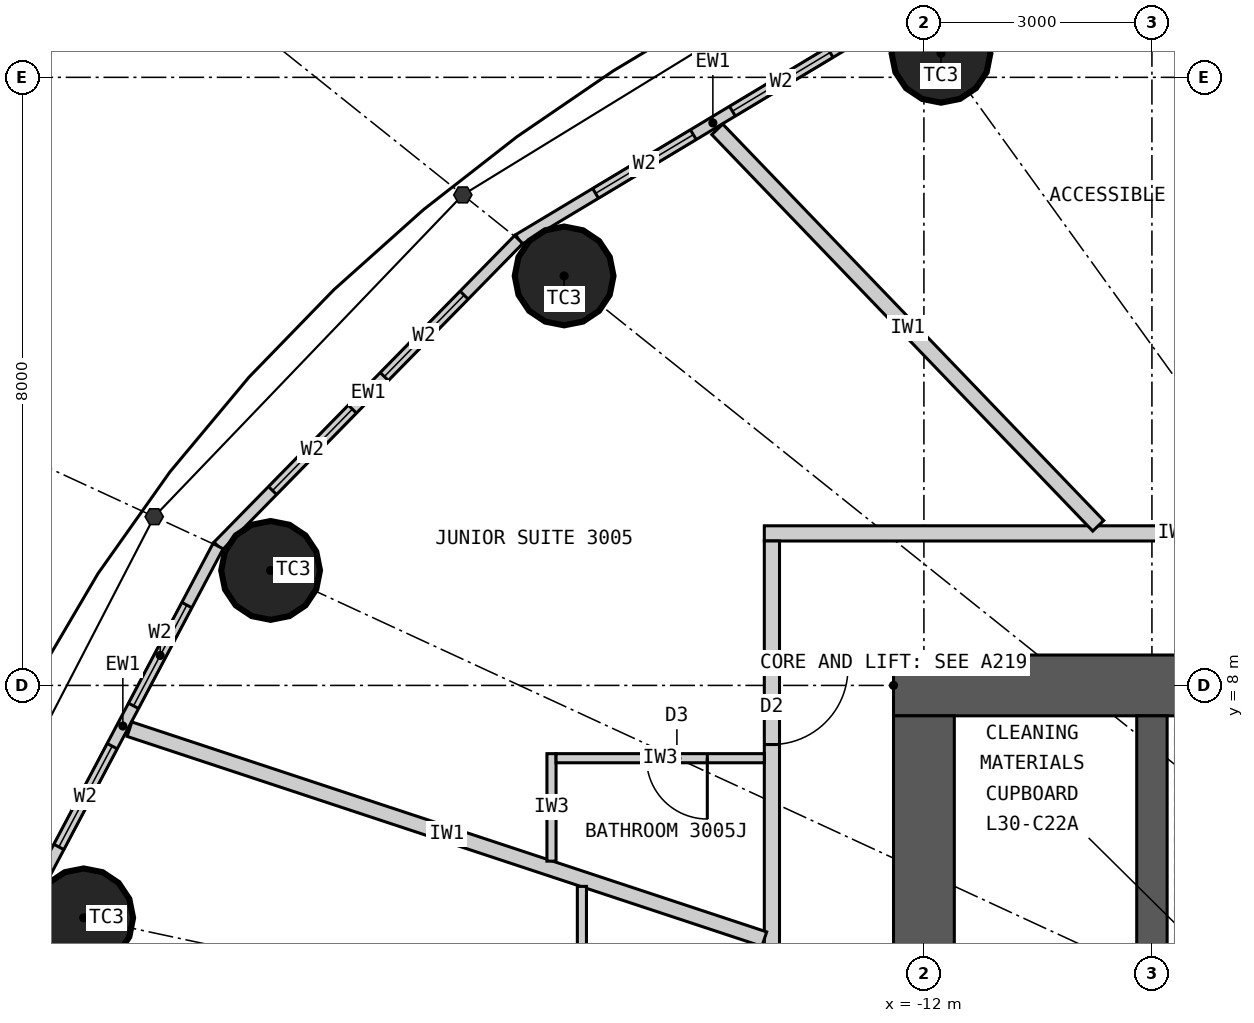
"""IFC4 building model, lengths in metres.
Left out: names, types, materials, properties, quantities, classifications, styles, units other than length and angle.
Written with IfcOpenShell. Run it as: python <this file> out.ifc"""

import sys

from ifc_helpers import new_model, si_unit, direction, frame, frame_2d, origin, origin_2d, place, context, subcontext, project, spatial, rectangle, circle, extrude, element, fill, save


model = new_model("IFC4")
c1 = context("Model", 3, precision=1e-05, world=origin(), true_north=direction((0.0, 1.0)))
c2 = subcontext(c1, "Body", "Model", "MODEL_VIEW")
j1 = project(units=[si_unit("LENGTHUNIT", "METRE"), si_unit("PLANEANGLEUNIT", "RADIAN")], contexts=[c1])
p1 = place(None, origin())
s1 = spatial("IfcSite", under=j1, at=p1, CompositionType="ELEMENT")
p2 = place(p1, origin())
s2 = spatial("IfcBuilding", under=s1, at=p2, CompositionType="ELEMENT")
p3 = place(p2, frame((0.0, 0.0, 118.8)))
s3 = spatial("IfcBuildingStorey", under=s2, at=p3, CompositionType="ELEMENT", Elevation=118.8)
for number, where, z_axis, x_axis in (
    (1, (-11.775, 16.316, 0.0), (0.0, 0.0, 1.0), (1.0, 0.0, 0.0)),
    (2, (-16.734, 13.387, 0.0), (0.0, 0.0, 1.0), (1.0, 0.0, 0.0)),
    (3, (-20.596, 9.513, 0.0), (0.0, 0.0, 1.0), (1.0, 0.0, 0.0)),
    (4, (-23.055, 4.942, 0.0), (0.0, 0.0, 1.0), (1.0, 0.0, 0.0)),
):
    element("IfcColumn", number, at=place(p3, frame(where, z_axis=z_axis, x_axis=x_axis)), inside=s3, PredefinedType="COLUMN", context=c2, shape_type="SweptSolid", body=[
        extrude(circle(Radius=0.65, at=origin_2d()), origin(), (0.0, 0.0, 1.0), 3.3),
    ])
p4 = place(p3, frame((-12.4, 8.0, 0.0), z_axis=(0.0, 0.0, 1.0), x_axis=(1.0, 0.0, 0.0)))
e5 = element("IfcWall", 5, at=p4, inside=s3, PredefinedType="SHEAR", context=c2, shape_type="SweptSolid", body=[
    extrude(rectangle(XDim=24.8, YDim=0.8, at=frame_2d((12.4, 0.0))), origin(), (0.0, 0.0, 1.0), 3.3),
])
p5 = place(p4, frame((11.1, 0.0, 0.0)))
e6 = element("IfcOpeningElement", 6, at=p5, cuts=e5, PredefinedType="OPENING", context=c2, shape_type="SweptSolid", body=[
    extrude(rectangle(XDim=1.2, YDim=2.2, at=frame_2d((0.6, 1.1))), frame((0.0, 0.41, 0.0), z_axis=(0.0, -1.0, 0.0), x_axis=(1.0, 0.0, 0.0)), (0.0, 0.0, 1.0), 0.82),
])
p6 = place(p4, frame((18.7, 0.0, 0.0)))
e7 = element("IfcOpeningElement", 7, at=p6, cuts=e5, PredefinedType="OPENING", context=c2, shape_type="SweptSolid", body=[
    extrude(rectangle(XDim=0.9, YDim=2.2, at=frame_2d((0.45, 1.1))), frame((0.0, 0.41, 0.0), z_axis=(0.0, -1.0, 0.0), x_axis=(1.0, 0.0, 0.0)), (0.0, 0.0, 1.0), 0.82),
])
p7 = place(p3, frame((-12.0, 7.6, 0.0), z_axis=(0.0, 0.0, 1.0), x_axis=(0.0, -1.0, 0.0)))
e8 = element("IfcWall", 8, at=p7, inside=s3, PredefinedType="SHEAR", context=c2, shape_type="SweptSolid", body=[
    extrude(rectangle(XDim=15.2, YDim=0.8, at=frame_2d((7.6, 0.0))), origin(), (0.0, 0.0, 1.0), 3.3),
])
p8 = place(p7, frame((6.7, 0.0, 0.0)))
e9 = element("IfcOpeningElement", 9, at=p8, cuts=e8, PredefinedType="OPENING", context=c2, shape_type="SweptSolid", body=[
    extrude(rectangle(XDim=1.8, YDim=2.2, at=frame_2d((0.9, 1.1))), frame((0.0, 0.41, 0.0), z_axis=(0.0, -1.0, 0.0), x_axis=(1.0, 0.0, 0.0)), (0.0, 0.0, 1.0), 0.82),
])
p9 = place(p3, frame((-9.0, 4.5, 0.0), z_axis=(0.0, 0.0, 1.0), x_axis=(0.0, 1.0, 0.0)))
e10 = element("IfcWall", 10, at=p9, inside=s3, PredefinedType="SHEAR", context=c2, shape_type="SweptSolid", body=[
    extrude(rectangle(XDim=3.1, YDim=0.4, at=frame_2d((1.55, 0.0))), origin(), (0.0, 0.0, 1.0), 3.3),
])
p10 = place(p3, frame((-12.221, 16.935, 0.0), z_axis=(0.0, 0.0, 1.0), x_axis=(-0.857308573723, -0.514802884044, 0.0)))
e11 = element("IfcWall", 11, at=p10, inside=s3, PredefinedType="ELEMENTEDWALL", context=c2, shape_type="SweptSolid", body=[
    extrude(rectangle(XDim=5.961, YDim=0.15, at=frame_2d((2.98, 0.0))), origin(), (0.0, 0.0, 1.0), 3.12),
])
p11 = place(p10, frame((1.181, 0.0, 0.9)))
e12 = element("IfcOpeningElement", 12, at=p11, cuts=e11, PredefinedType="OPENING", context=c2, shape_type="SweptSolid", body=[
    extrude(rectangle(XDim=1.5, YDim=1.9, at=frame_2d((0.75, 0.95))), frame((0.0, 0.085, 0.0), z_axis=(0.0, -1.0, 0.0), x_axis=(1.0, 0.0, 0.0)), (0.0, 0.0, 1.0), 0.17),
])
p12 = place(p10, frame((3.281, 0.0, 0.9)))
e13 = element("IfcOpeningElement", 13, at=p12, cuts=e11, PredefinedType="OPENING", context=c2, shape_type="SweptSolid", body=[
    extrude(rectangle(XDim=1.5, YDim=1.9, at=frame_2d((0.75, 0.95))), frame((0.0, 0.085, 0.0), z_axis=(0.0, -1.0, 0.0), x_axis=(1.0, 0.0, 0.0)), (0.0, 0.0, 1.0), 0.17),
])
p13 = place(p3, frame((-17.332, 13.866, 0.0), z_axis=(0.0, 0.0, 1.0), x_axis=(-0.700136650834, -0.714008872605, 0.0)))
e14 = element("IfcWall", 14, at=p13, inside=s3, PredefinedType="ELEMENTEDWALL", context=c2, shape_type="SweptSolid", body=[
    extrude(rectangle(XDim=5.649, YDim=0.15, at=frame_2d((2.825, 0.0))), origin(), (0.0, 0.0, 1.0), 3.12),
])
p14 = place(p13, frame((1.025, 0.0, 0.9)))
e15 = element("IfcOpeningElement", 15, at=p14, cuts=e14, PredefinedType="OPENING", context=c2, shape_type="SweptSolid", body=[
    extrude(rectangle(XDim=1.5, YDim=1.9, at=frame_2d((0.75, 0.95))), frame((0.0, 0.085, 0.0), z_axis=(0.0, -1.0, 0.0), x_axis=(1.0, 0.0, 0.0)), (0.0, 0.0, 1.0), 0.17),
])
p15 = place(p13, frame((3.125, 0.0, 0.9)))
e16 = element("IfcOpeningElement", 16, at=p15, cuts=e14, PredefinedType="OPENING", context=c2, shape_type="SweptSolid", body=[
    extrude(rectangle(XDim=1.5, YDim=1.9, at=frame_2d((0.75, 0.95))), frame((0.0, 0.085, 0.0), z_axis=(0.0, -1.0, 0.0), x_axis=(1.0, 0.0, 0.0)), (0.0, 0.0, 1.0), 0.17),
])
p16 = place(p3, frame((-21.287, 9.832, 0.0), z_axis=(0.0, 0.0, 1.0), x_axis=(-0.467814388454, -0.883826735257, 0.0)))
e17 = element("IfcWall", 17, at=p16, inside=s3, PredefinedType="ELEMENTEDWALL", context=c2, shape_type="SweptSolid", body=[
    extrude(rectangle(XDim=5.354, YDim=0.15, at=frame_2d((2.677, 0.0))), origin(), (0.0, 0.0, 1.0), 3.12),
])
p17 = place(p16, frame((0.877, 0.0, 0.9)))
e18 = element("IfcOpeningElement", 18, at=p17, cuts=e17, PredefinedType="OPENING", context=c2, shape_type="SweptSolid", body=[
    extrude(rectangle(XDim=1.5, YDim=1.9, at=frame_2d((0.75, 0.95))), frame((0.0, 0.085, 0.0), z_axis=(0.0, -1.0, 0.0), x_axis=(1.0, 0.0, 0.0)), (0.0, 0.0, 1.0), 0.17),
])
p18 = place(p16, frame((2.977, 0.0, 0.9)))
e19 = element("IfcOpeningElement", 19, at=p18, cuts=e17, PredefinedType="OPENING", context=c2, shape_type="SweptSolid", body=[
    extrude(rectangle(XDim=1.5, YDim=1.9, at=frame_2d((0.75, 0.95))), frame((0.0, 0.085, 0.0), z_axis=(0.0, -1.0, 0.0), x_axis=(1.0, 0.0, 0.0)), (0.0, 0.0, 1.0), 0.17),
])
p19 = place(p3, frame((-14.1, 10.0, 0.0), z_axis=(0.0, 0.0, 1.0), x_axis=(1.0, 0.0, 0.0)))
e20 = element("IfcWall", 20, at=p19, inside=s3, PredefinedType="PARTITIONING", context=c2, shape_type="SweptSolid", body=[
    extrude(rectangle(XDim=10.817, YDim=0.2, at=frame_2d((5.409, 0.0))), origin(), (0.0, 0.0, 1.0), 3.12),
])
p20 = place(p3, frame((-14.0, 9.9, 0.0), z_axis=(0.0, 0.0, 1.0), x_axis=(0.0, -1.0, 0.0)))
e21 = element("IfcWall", 21, at=p20, inside=s3, PredefinedType="PARTITIONING", context=c2, shape_type="SweptSolid", body=[
    extrude(rectangle(XDim=19.8, YDim=0.2, at=frame_2d((9.9, 0.0))), origin(), (0.0, 0.0, 1.0), 3.12),
])
p21 = place(p20, frame((1.678, 0.0, 0.0)))
e22 = element("IfcOpeningElement", 22, at=p21, cuts=e21, PredefinedType="OPENING", context=c2, shape_type="SweptSolid", body=[
    extrude(rectangle(XDim=1.0, YDim=2.2, at=frame_2d((0.5, 1.1))), frame((0.0, 0.11, 0.0), z_axis=(0.0, -1.0, 0.0), x_axis=(1.0, 0.0, 0.0)), (0.0, 0.0, 1.0), 0.22),
])
p22 = place(p20, frame((7.598, 0.0, 0.0)))
e23 = element("IfcOpeningElement", 23, at=p22, cuts=e21, PredefinedType="OPENING", context=c2, shape_type="SweptSolid", body=[
    extrude(rectangle(XDim=1.0, YDim=2.2, at=frame_2d((0.5, 1.1))), frame((0.0, 0.11, 0.0), z_axis=(0.0, -1.0, 0.0), x_axis=(1.0, 0.0, 0.0)), (0.0, 0.0, 1.0), 0.22),
])
p23 = place(p20, frame((12.26, 0.0, 0.0)))
e24 = element("IfcOpeningElement", 24, at=p23, cuts=e21, PredefinedType="OPENING", context=c2, shape_type="SweptSolid", body=[
    extrude(rectangle(XDim=1.0, YDim=2.2, at=frame_2d((0.5, 1.1))), frame((0.0, 0.11, 0.0), z_axis=(0.0, -1.0, 0.0), x_axis=(1.0, 0.0, 0.0)), (0.0, 0.0, 1.0), 0.22),
])
p24 = place(p20, frame((16.922, 0.0, 0.0)))
e25 = element("IfcOpeningElement", 25, at=p24, cuts=e21, PredefinedType="OPENING", context=c2, shape_type="SweptSolid", body=[
    extrude(rectangle(XDim=1.0, YDim=2.2, at=frame_2d((0.5, 1.1))), frame((0.0, 0.11, 0.0), z_axis=(0.0, -1.0, 0.0), x_axis=(1.0, 0.0, 0.0)), (0.0, 0.0, 1.0), 0.22),
])
p25 = place(p3, frame((-9.706, 10.1, 0.0), z_axis=(0.0, 0.0, 1.0), x_axis=(-0.692944801824, 0.720990639069, 0.0)))
e26 = element("IfcWall", 26, at=p25, inside=s3, PredefinedType="PARTITIONING", context=c2, shape_type="SweptSolid", body=[
    extrude(rectangle(XDim=7.234, YDim=0.2, at=frame_2d((3.617, 0.0))), origin(), (0.0, 0.0, 1.0), 3.12),
])
p26 = place(p3, frame((-14.1, 4.662, 0.0), z_axis=(0.0, 0.0, 1.0), x_axis=(-0.949446466373, 0.313928984789, 0.0)))
e27 = element("IfcWall", 27, at=p26, inside=s3, PredefinedType="PARTITIONING", context=c2, shape_type="SweptSolid", body=[
    extrude(rectangle(XDim=8.797, YDim=0.2, at=frame_2d((4.399, 0.0))), origin(), (0.0, 0.0, 1.0), 3.12),
])
p27 = place(p3, frame((-16.9, 5.688, 0.0), z_axis=(0.0, 0.0, 1.0), x_axis=(0.0, 1.0, 0.0)))
e28 = element("IfcWall", 28, at=p27, inside=s3, PredefinedType="PARTITIONING", context=c2, shape_type="SweptSolid", body=[
    extrude(rectangle(XDim=1.414, YDim=0.12, at=frame_2d((0.707, 0.0))), origin(), (0.0, 0.0, 1.0), 3.12),
])
p28 = place(p3, frame((-14.1, 7.042, 0.0), z_axis=(0.0, 0.0, 1.0), x_axis=(-1.0, 0.0, 0.0)))
e29 = element("IfcWall", 29, at=p28, inside=s3, PredefinedType="PARTITIONING", context=c2, shape_type="SweptSolid", body=[
    extrude(rectangle(XDim=2.74, YDim=0.12, at=frame_2d((1.37, 0.0))), origin(), (0.0, 0.0, 1.0), 3.12),
])
p29 = place(p28, frame((0.75, 0.0, 0.0)))
e30 = element("IfcOpeningElement", 30, at=p29, cuts=e29, PredefinedType="OPENING", context=c2, shape_type="SweptSolid", body=[
    extrude(rectangle(XDim=0.8, YDim=2.1, at=frame_2d((0.4, 1.05))), frame((0.0, 0.07, 0.0), z_axis=(0.0, -1.0, 0.0), x_axis=(1.0, 0.0, 0.0)), (0.0, 0.0, 1.0), 0.14),
])
p30 = place(p3, frame((-16.5, 5.356, 0.0), z_axis=(0.0, 0.0, 1.0), x_axis=(0.0, -1.0, 0.0)))
e31 = element("IfcWall", 31, at=p30, inside=s3, PredefinedType="PARTITIONING", context=c2, shape_type="SweptSolid", body=[
    extrude(rectangle(XDim=2.934, YDim=0.12, at=frame_2d((1.467, 0.0))), origin(), (0.0, 0.0, 1.0), 3.12),
])
p31 = place(p11, origin())
e32 = element("IfcWindow", 32, at=p31, inside=s3, PartitioningType="SINGLE_PANEL", PredefinedType="WINDOW", context=c2, shape_type="SweptSolid", body=[
    extrude(rectangle(XDim=1.5, YDim=1.9, at=frame_2d((0.75, 0.95))), frame((0.0, 0.03, 0.0), z_axis=(0.0, -1.0, 0.0), x_axis=(1.0, 0.0, 0.0)), (0.0, 0.0, 1.0), 0.06),
])
fill(e12, e32)
p32 = place(p12, origin())
e33 = element("IfcWindow", 33, at=p32, inside=s3, PartitioningType="SINGLE_PANEL", PredefinedType="WINDOW", context=c2, shape_type="SweptSolid", body=[
    extrude(rectangle(XDim=1.5, YDim=1.9, at=frame_2d((0.75, 0.95))), frame((0.0, 0.03, 0.0), z_axis=(0.0, -1.0, 0.0), x_axis=(1.0, 0.0, 0.0)), (0.0, 0.0, 1.0), 0.06),
])
fill(e13, e33)
p33 = place(p14, origin())
e34 = element("IfcWindow", 34, at=p33, inside=s3, PartitioningType="SINGLE_PANEL", PredefinedType="WINDOW", context=c2, shape_type="SweptSolid", body=[
    extrude(rectangle(XDim=1.5, YDim=1.9, at=frame_2d((0.75, 0.95))), frame((0.0, 0.03, 0.0), z_axis=(0.0, -1.0, 0.0), x_axis=(1.0, 0.0, 0.0)), (0.0, 0.0, 1.0), 0.06),
])
fill(e15, e34)
p34 = place(p15, origin())
e35 = element("IfcWindow", 35, at=p34, inside=s3, PartitioningType="SINGLE_PANEL", PredefinedType="WINDOW", context=c2, shape_type="SweptSolid", body=[
    extrude(rectangle(XDim=1.5, YDim=1.9, at=frame_2d((0.75, 0.95))), frame((0.0, 0.03, 0.0), z_axis=(0.0, -1.0, 0.0), x_axis=(1.0, 0.0, 0.0)), (0.0, 0.0, 1.0), 0.06),
])
fill(e16, e35)
p35 = place(p17, origin())
e36 = element("IfcWindow", 36, at=p35, inside=s3, PartitioningType="SINGLE_PANEL", PredefinedType="WINDOW", context=c2, shape_type="SweptSolid", body=[
    extrude(rectangle(XDim=1.5, YDim=1.9, at=frame_2d((0.75, 0.95))), frame((0.0, 0.03, 0.0), z_axis=(0.0, -1.0, 0.0), x_axis=(1.0, 0.0, 0.0)), (0.0, 0.0, 1.0), 0.06),
])
fill(e18, e36)
p36 = place(p18, origin())
e37 = element("IfcWindow", 37, at=p36, inside=s3, PartitioningType="SINGLE_PANEL", PredefinedType="WINDOW", context=c2, shape_type="SweptSolid", body=[
    extrude(rectangle(XDim=1.5, YDim=1.9, at=frame_2d((0.75, 0.95))), frame((0.0, 0.03, 0.0), z_axis=(0.0, -1.0, 0.0), x_axis=(1.0, 0.0, 0.0)), (0.0, 0.0, 1.0), 0.06),
])
fill(e19, e37)
p37 = place(p29, origin())
e38 = element("IfcDoor", 38, at=p37, inside=s3, OperationType="SINGLE_SWING_LEFT", PredefinedType="DOOR", context=c2, shape_type="SweptSolid", body=[
    extrude(rectangle(XDim=0.8, YDim=2.1, at=frame_2d((0.4, 1.05))), frame((0.0, 0.025, 0.0), z_axis=(0.0, -1.0, 0.0), x_axis=(1.0, 0.0, 0.0)), (0.0, 0.0, 1.0), 0.05),
])
fill(e30, e38)
p38 = place(p21, origin())
e39 = element("IfcDoor", 39, at=p38, inside=s3, OperationType="SINGLE_SWING_LEFT", PredefinedType="DOOR", context=c2, shape_type="SweptSolid", body=[
    extrude(rectangle(XDim=1.0, YDim=2.2, at=frame_2d((0.5, 1.1))), frame((0.0, 0.025, 0.0), z_axis=(0.0, -1.0, 0.0), x_axis=(1.0, 0.0, 0.0)), (0.0, 0.0, 1.0), 0.05),
])
fill(e22, e39)
save(model, sys.argv[1])
